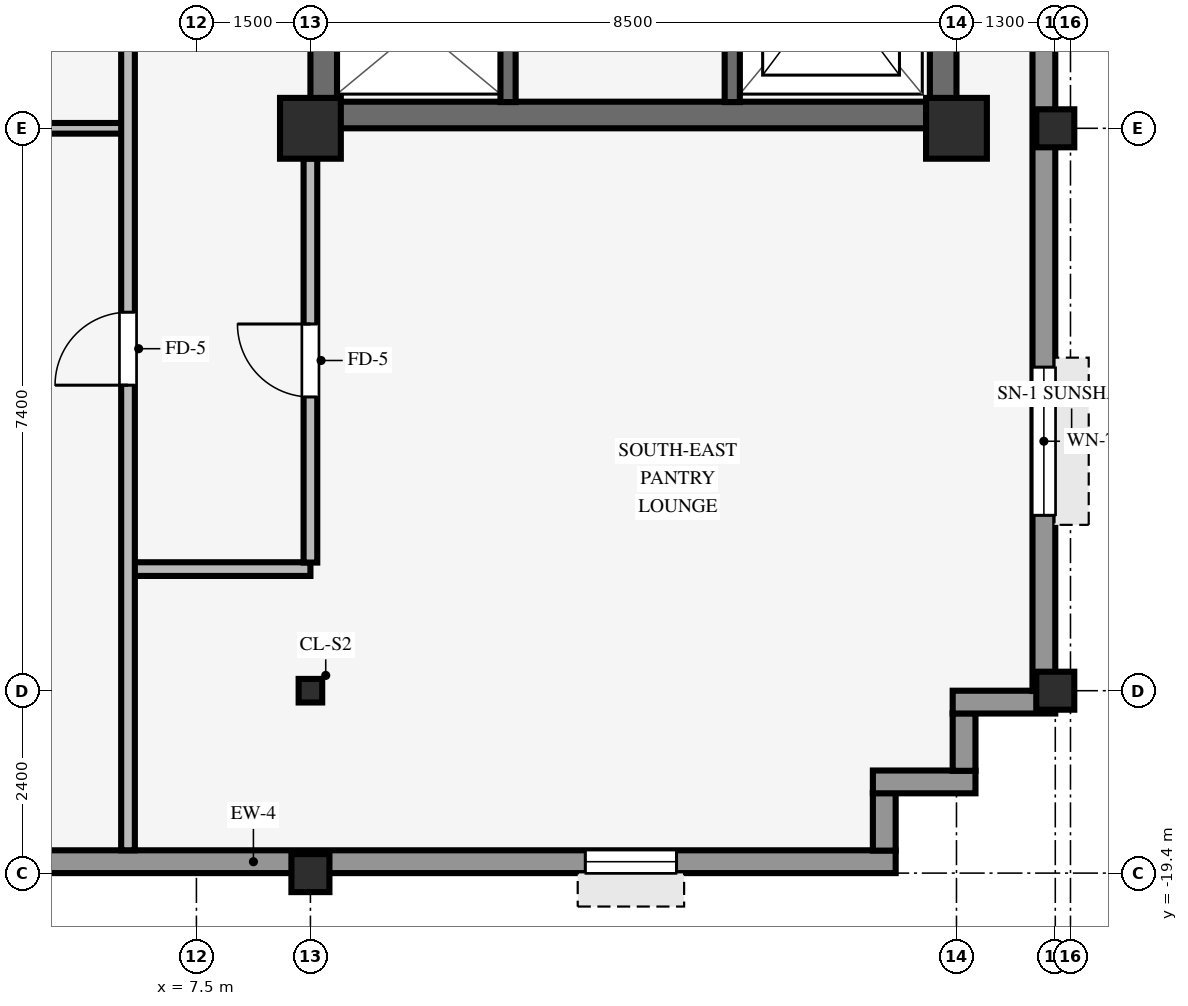
"""IFC4 building model, lengths in metres.
Left out: names, types, materials, properties, quantities, classifications, styles, units other than length and angle.
Written with IfcOpenShell. Run it as: python <this file> out.ifc"""

import sys

from ifc_helpers import new_model, si_unit, direction, frame, frame_2d, origin, origin_2d, place, context, subcontext, project, spatial, rectangle, hollow_rectangle, i_section, extrude, source, transform, mapped, element, fill, save


model = new_model("IFC4")
c1 = context("Model", 3, precision=1e-05, world=origin(), true_north=direction((0.0, 1.0)))
c2 = subcontext(c1, "Body", "Model", "MODEL_VIEW")
j1 = project(units=[si_unit("LENGTHUNIT", "METRE"), si_unit("PLANEANGLEUNIT", "RADIAN")], contexts=[c1])
p1 = place(None, origin())
s1 = spatial("IfcSite", under=j1, at=p1, CompositionType="ELEMENT")
p2 = place(p1, origin())
s2 = spatial("IfcBuilding", under=s1, at=p2, CompositionType="ELEMENT")
p3 = place(p2, frame((0.0, 0.0, 227.4)))
s3 = spatial("IfcBuildingStorey", under=s2, at=p3, CompositionType="ELEMENT", Elevation=227.4)
p4 = place(p3, frame((9.0, -9.425, 0.0), z_axis=(0.0, 0.0, 1.0), x_axis=(1.0, 0.0, 0.0)))
e1 = element("IfcWall", 1, at=p4, inside=s3, PredefinedType="SHEAR", context=c2, shape_type="SweptSolid", body=[
    extrude(rectangle(XDim=8.5, YDim=0.35, at=frame_2d((4.25, 0.0))), origin(), (0.0, 0.0, 1.0), 3.37),
])
p5 = place(p3, frame((9.175, -9.255, 0.0), z_axis=(0.0, 0.0, 1.0), x_axis=(0.0, 1.0, 0.0)))
e2 = element("IfcWall", 2, at=p5, inside=s3, PredefinedType="SHEAR", context=c2, shape_type="SweptSolid", body=[
    extrude(rectangle(XDim=18.51, YDim=0.35, at=frame_2d((9.255, 0.0))), origin(), (0.0, 0.0, 1.0), 3.37),
])
p6 = place(p5, frame((8.655, 0.0, 0.0)))
e3 = element("IfcOpeningElement", 3, at=p6, cuts=e2, PredefinedType="OPENING", context=c2, shape_type="SweptSolid", body=[
    extrude(rectangle(XDim=1.2, YDim=2.15, at=frame_2d((0.6, 1.075))), frame((0.0, 0.185, 0.0), z_axis=(0.0, -1.0, 0.0), x_axis=(1.0, 0.0, 0.0)), (0.0, 0.0, 1.0), 0.37),
])
p7 = place(p3, frame((17.325, -9.255, 0.0), z_axis=(0.0, 0.0, 1.0), x_axis=(0.0, 1.0, 0.0)))
e4 = element("IfcWall", 4, at=p7, inside=s3, PredefinedType="SHEAR", context=c2, shape_type="SweptSolid", body=[
    extrude(rectangle(XDim=18.51, YDim=0.35, at=frame_2d((9.255, 0.0))), origin(), (0.0, 0.0, 1.0), 3.37),
])
for number, where, z_axis, x_axis in (
    (5, (9.0, -9.6, 0.0), (0.0, 0.0, 1.0), (1.0, 0.0, 0.0)),
    (6, (17.5, -9.6, 0.0), (0.0, 0.0, 1.0), (1.0, 0.0, 0.0)),
):
    element("IfcColumn", number, at=place(p3, frame(where, z_axis=z_axis, x_axis=x_axis)), inside=s3, PredefinedType="COLUMN", context=c2, shape_type="SweptSolid", body=[
        extrude(rectangle(XDim=0.8, YDim=0.8, at=origin_2d()), origin(), (0.0, 0.0, 1.0), 3.37),
    ])
for number, where, z_axis, x_axis in (
    (7, (18.8, -17.0, 0.0), (0.0, 0.0, 1.0), (1.0, 0.0, 0.0)),
    (8, (18.8, -9.6, 0.0), (0.0, 0.0, 1.0), (1.0, 0.0, 0.0)),
    (9, (9.0, -19.4, 0.0), (0.0, 0.0, 1.0), (1.0, 0.0, 0.0)),
):
    element("IfcColumn", number, at=place(p3, frame(where, z_axis=z_axis, x_axis=x_axis)), inside=s3, PredefinedType="COLUMN", context=c2, shape_type="SweptSolid", body=[
        extrude(hollow_rectangle(XDim=0.5, YDim=0.5, WallThickness=0.032, InnerFilletRadius=0.032, OuterFilletRadius=0.064, at=origin_2d()), origin(), (0.0, 0.0, 1.0), 3.37),
    ])
p8 = place(p3, frame((9.0, -17.0, 0.0), z_axis=(0.0, 0.0, 1.0), x_axis=(1.0, 0.0, 0.0)))
e10 = element("IfcColumn", 10, at=p8, inside=s3, PredefinedType="COLUMN", context=c2, shape_type="SweptSolid", body=[
    extrude(i_section(OverallWidth=0.31, OverallDepth=0.31, WebThickness=0.015, FlangeThickness=0.015, FilletRadius=0.015, at=origin_2d()), origin(), (0.0, 0.0, 1.0), 3.37),
])
p9 = place(p3, frame((-0.2, -19.25, 0.0), z_axis=(0.0, 0.0, 1.0), x_axis=(1.0, 0.0, 0.0)))
e11 = element("IfcWall", 11, at=p9, inside=s3, PredefinedType="STANDARD", context=c2, shape_type="SweptSolid", body=[
    extrude(rectangle(XDim=16.9, YDim=0.3, at=frame_2d((8.45, 0.0))), origin(), (0.0, 0.0, 1.0), 2.705),
])
p10 = place(p9, frame((2.883, 0.0, 0.8)))
e12 = element("IfcOpeningElement", 12, at=p10, cuts=e11, PredefinedType="OPENING", context=c2, shape_type="SweptSolid", body=[
    extrude(rectangle(XDim=1.2, YDim=1.48, at=frame_2d((0.6, 0.74))), frame((0.0, 0.16, 0.0), z_axis=(0.0, -1.0, 0.0), x_axis=(1.0, 0.0, 0.0)), (0.0, 0.0, 1.0), 0.32),
])
p11 = place(p9, frame((12.817, 0.0, 0.8)))
e13 = element("IfcOpeningElement", 13, at=p11, cuts=e11, PredefinedType="OPENING", context=c2, shape_type="SweptSolid", body=[
    extrude(rectangle(XDim=1.2, YDim=1.48, at=frame_2d((0.6, 0.74))), frame((0.0, 0.16, 0.0), z_axis=(0.0, -1.0, 0.0), x_axis=(1.0, 0.0, 0.0)), (0.0, 0.0, 1.0), 0.32),
])
p12 = place(p3, frame((16.55, -19.104, 0.0), z_axis=(0.0, 0.0, 1.0), x_axis=(0.0, 1.0, 0.0)))
e14 = element("IfcWall", 14, at=p12, inside=s3, PredefinedType="STANDARD", context=c2, shape_type="SweptSolid", body=[
    extrude(rectangle(XDim=0.758, YDim=0.3, at=frame_2d((0.379, 0.0))), origin(), (0.0, 0.0, 1.0), 2.892),
])
p13 = place(p3, frame((16.4, -18.2, 0.0), z_axis=(0.0, 0.0, 1.0), x_axis=(1.0, 0.0, 0.0)))
e15 = element("IfcWall", 15, at=p13, inside=s3, PredefinedType="STANDARD", context=c2, shape_type="SweptSolid", body=[
    extrude(rectangle(XDim=1.35, YDim=0.3, at=frame_2d((0.675, 0.0))), origin(), (0.0, 0.0, 1.0), 2.892),
])
p14 = place(p3, frame((17.6, -18.054, 0.0), z_axis=(0.0, 0.0, 1.0), x_axis=(0.0, 1.0, 0.0)))
e16 = element("IfcWall", 16, at=p14, inside=s3, PredefinedType="STANDARD", context=c2, shape_type="SweptSolid", body=[
    extrude(rectangle(XDim=0.758, YDim=0.3, at=frame_2d((0.379, 0.0))), origin(), (0.0, 0.0, 1.0), 2.892),
])
p15 = place(p3, frame((17.45, -17.15, 0.0), z_axis=(0.0, 0.0, 1.0), x_axis=(1.0, 0.0, 0.0)))
e17 = element("IfcWall", 17, at=p15, inside=s3, PredefinedType="STANDARD", context=c2, shape_type="SweptSolid", body=[
    extrude(rectangle(XDim=1.35, YDim=0.3, at=frame_2d((0.675, 0.0))), origin(), (0.0, 0.0, 1.0), 2.892),
])
p16 = place(p3, frame((18.65, -17.004, 0.0), z_axis=(0.0, 0.0, 1.0), x_axis=(0.0, 1.0, 0.0)))
e18 = element("IfcWall", 18, at=p16, inside=s3, PredefinedType="STANDARD", context=c2, shape_type="SweptSolid", body=[
    extrude(rectangle(XDim=34.008, YDim=0.3, at=frame_2d((17.004, 0.0))), origin(), (0.0, 0.0, 1.0), 2.705),
])
p17 = place(p16, frame((30.754, 0.0, 0.0), z_axis=(0.0, 0.0, 1.0), x_axis=(-1.0, 0.0, 0.0)))
e19 = element("IfcOpeningElement", 19, at=p17, cuts=e18, PredefinedType="OPENING", context=c2, shape_type="SweptSolid", body=[
    extrude(rectangle(XDim=1.05, YDim=2.1, at=frame_2d((0.525, 1.05))), frame((0.0, 0.16, 0.0), z_axis=(0.0, -1.0, 0.0), x_axis=(1.0, 0.0, 0.0)), (0.0, 0.0, 1.0), 0.32),
])
p18 = place(p16, frame((2.311, 0.0, 0.8)))
e20 = element("IfcOpeningElement", 20, at=p18, cuts=e18, PredefinedType="OPENING", context=c2, shape_type="SweptSolid", body=[
    extrude(rectangle(XDim=1.95, YDim=1.48, at=frame_2d((0.975, 0.74))), frame((0.0, 0.16, 0.0), z_axis=(0.0, -1.0, 0.0), x_axis=(1.0, 0.0, 0.0)), (0.0, 0.0, 1.0), 0.32),
])
p19 = place(p3, frame((14.55, -9.255, 0.0), z_axis=(0.0, 0.0, 1.0), x_axis=(0.0, 1.0, 0.0)))
e21 = element("IfcWall", 21, at=p19, inside=s3, PredefinedType="SHEAR", context=c2, shape_type="SweptSolid", body=[
    extrude(rectangle(XDim=10.16, YDim=0.2, at=frame_2d((5.08, 0.0))), origin(), (0.0, 0.0, 1.0), 3.37),
])
p20 = place(p19, frame((6.615, 0.0, 0.0)))
e22 = element("IfcOpeningElement", 22, at=p20, cuts=e21, PredefinedType="OPENING", context=c2, shape_type="SweptSolid", body=[
    extrude(rectangle(XDim=0.88, YDim=2.1, at=frame_2d((0.44, 1.05))), frame((0.0, 0.11, 0.0), z_axis=(0.0, -1.0, 0.0), x_axis=(1.0, 0.0, 0.0)), (0.0, 0.0, 1.0), 0.22),
])
p21 = place(p19, frame((0.98, 0.0, 0.0)))
e23 = element("IfcOpeningElement", 23, at=p21, cuts=e21, PredefinedType="OPENING", context=c2, shape_type="SweptSolid", body=[
    extrude(rectangle(XDim=1.15, YDim=2.15, at=frame_2d((0.575, 1.075))), frame((0.0, 0.11, 0.0), z_axis=(0.0, -1.0, 0.0), x_axis=(1.0, 0.0, 0.0)), (0.0, 0.0, 1.0), 0.22),
])
p22 = place(p3, frame((11.6, -9.255, 0.0), z_axis=(0.0, 0.0, 1.0), x_axis=(0.0, 1.0, 0.0)))
e24 = element("IfcWall", 24, at=p22, inside=s3, PredefinedType="SHEAR", context=c2, shape_type="SweptSolid", body=[
    extrude(rectangle(XDim=8.025, YDim=0.2, at=frame_2d((4.012, 0.0))), origin(), (0.0, 0.0, 1.0), 3.37),
])
p23 = place(p3, frame((6.666, -15.4, 0.0), z_axis=(0.0, 0.0, 1.0), x_axis=(1.0, 0.0, 0.0)))
e25 = element("IfcWall", 25, at=p23, inside=s3, PredefinedType="PARTITIONING", context=c2, shape_type="SweptSolid", body=[
    extrude(rectangle(XDim=2.334, YDim=0.18, at=frame_2d((1.167, 0.0))), origin(), (0.0, 0.0, 1.0), 3.36),
])
p24 = place(p3, frame((0.151, -9.6, 0.0), z_axis=(0.0, 0.0, 1.0), x_axis=(1.0, 0.0, 0.0)))
e26 = element("IfcWall", 26, at=p24, inside=s3, PredefinedType="PARTITIONING", context=c2, shape_type="SweptSolid", body=[
    extrude(rectangle(XDim=6.383, YDim=0.14, at=frame_2d((3.191, 0.0))), origin(), (0.0, 0.0, 1.0), 2.405),
])
p25 = place(p3, frame((6.6, -19.1, 0.0), z_axis=(0.0, 0.0, 1.0), x_axis=(0.0, 1.0, 0.0)))
e27 = element("IfcWall", 27, at=p25, inside=s3, PredefinedType="PARTITIONING", context=c2, shape_type="SweptSolid", body=[
    extrude(rectangle(XDim=17.764, YDim=0.18, at=frame_2d((8.882, 0.0))), origin(), (0.0, 0.0, 1.0), 3.36),
])
p26 = place(p25, frame((6.12, 0.0, 0.0)))
e28 = element("IfcOpeningElement", 28, at=p26, cuts=e27, PredefinedType="OPENING", context=c2, shape_type="SweptSolid", body=[
    extrude(rectangle(XDim=0.96, YDim=2.1, at=frame_2d((0.48, 1.05))), frame((0.0, 0.1, 0.0), z_axis=(0.0, -1.0, 0.0), x_axis=(1.0, 0.0, 0.0)), (0.0, 0.0, 1.0), 0.2),
])
p27 = place(p3, frame((9.0, -15.314, 0.0), z_axis=(0.0, 0.0, 1.0), x_axis=(0.0, 1.0, 0.0)))
e29 = element("IfcWall", 29, at=p27, inside=s3, PredefinedType="PARTITIONING", context=c2, shape_type="SweptSolid", body=[
    extrude(rectangle(XDim=5.318, YDim=0.18, at=frame_2d((2.659, 0.0))), origin(), (0.0, 0.0, 1.0), 2.892),
])
p28 = place(p27, frame((2.179, 0.0, 0.0)))
e30 = element("IfcOpeningElement", 30, at=p28, cuts=e29, PredefinedType="OPENING", context=c2, shape_type="SweptSolid", body=[
    extrude(rectangle(XDim=0.96, YDim=2.1, at=frame_2d((0.48, 1.05))), frame((0.0, 0.1, 0.0), z_axis=(0.0, -1.0, 0.0), x_axis=(1.0, 0.0, 0.0)), (0.0, 0.0, 1.0), 0.2),
])
m1 = source(origin(), c2, "Body", "SweptSolid", [
    extrude(rectangle(XDim=1.2, YDim=1.48, at=frame_2d((0.6, 0.74))), frame((0.0, 0.03, 0.0), z_axis=(0.0, -1.0, 0.0), x_axis=(1.0, 0.0, 0.0)), (0.0, 0.0, 1.0), 0.06),
])
p29 = place(p11, origin())
e31 = element("IfcWindow", 31, at=p29, inside=s3, PartitioningType="SINGLE_PANEL", PredefinedType="WINDOW", context=c2, shape_type="MappedRepresentation", body=[
    mapped(m1, transform((0.0, 0.0, 0.0), scale=1.0)),
])
fill(e13, e31)
m2 = source(origin(), c2, "Body", "SweptSolid", [
    extrude(rectangle(XDim=1.95, YDim=1.48, at=frame_2d((0.975, 0.74))), frame((0.0, 0.03, 0.0), z_axis=(0.0, -1.0, 0.0), x_axis=(1.0, 0.0, 0.0)), (0.0, 0.0, 1.0), 0.06),
])
p30 = place(p18, origin())
e32 = element("IfcWindow", 32, at=p30, inside=s3, PartitioningType="SINGLE_PANEL", PredefinedType="WINDOW", context=c2, shape_type="MappedRepresentation", body=[
    mapped(m2, transform((0.0, 0.0, 0.0), scale=1.0)),
])
fill(e20, e32)
m3 = source(origin(), c2, "Body", "SweptSolid", [
    extrude(rectangle(XDim=0.96, YDim=2.1, at=frame_2d((0.48, 1.05))), frame((0.0, 0.025, 0.0), z_axis=(0.0, -1.0, 0.0), x_axis=(1.0, 0.0, 0.0)), (0.0, 0.0, 1.0), 0.05),
])
p31 = place(p26, origin())
e33 = element("IfcDoor", 33, at=p31, inside=s3, OperationType="SINGLE_SWING_LEFT", PredefinedType="DOOR", context=c2, shape_type="MappedRepresentation", body=[
    mapped(m3, transform((0.0, 0.0, 0.0), scale=1.0)),
])
fill(e28, e33)
p32 = place(p28, origin())
e34 = element("IfcDoor", 34, at=p32, inside=s3, OperationType="SINGLE_SWING_RIGHT", PredefinedType="DOOR", context=c2, shape_type="MappedRepresentation", body=[
    mapped(m3, transform((0.0, 0.0, 0.0), scale=1.0)),
])
fill(e30, e34)
save(model, sys.argv[1])
